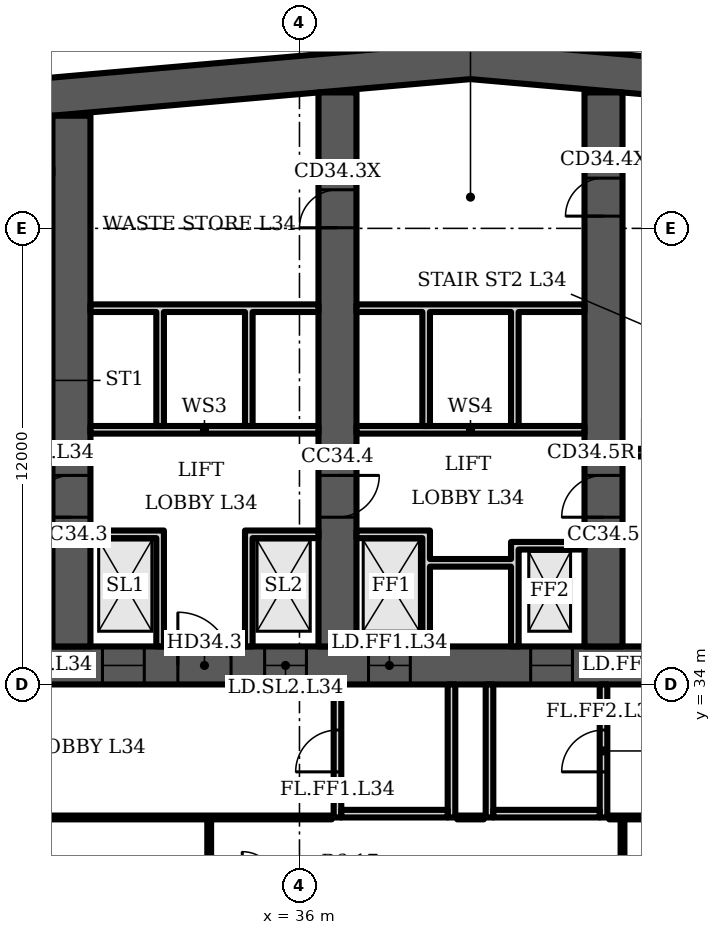
"""IFC4 building model, lengths in metres.
Left out: names, types, materials, properties, quantities, classifications, styles, units other than length and angle.
Written with IfcOpenShell. Run it as: python <this file> out.ifc"""

import sys

from ifc_helpers import new_model, si_unit, direction, frame, frame_2d, origin, place, context, subcontext, project, spatial, polyline, rectangle, outline, extrude, element, fill, save


model = new_model("IFC4")
c1 = context("Model", 3, precision=1e-05, world=origin(), true_north=direction((0.0, 1.0)))
c2 = subcontext(c1, "Body", "Model", "MODEL_VIEW")
j1 = project(units=[si_unit("LENGTHUNIT", "METRE"), si_unit("PLANEANGLEUNIT", "RADIAN")], contexts=[c1])
p1 = place(None, origin())
s1 = spatial("IfcSite", under=j1, at=p1, CompositionType="ELEMENT")
p2 = place(p1, origin())
s2 = spatial("IfcBuilding", under=s1, at=p2, CompositionType="ELEMENT")
p3 = place(p2, frame((0.0, 0.0, 143.5)))
s3 = spatial("IfcBuildingStorey", under=s2, at=p3, CompositionType="ELEMENT", Elevation=143.5)
p4 = place(p3, origin())
e1 = element("IfcWall", 1, at=p4, inside=s3, PredefinedType="SHEAR", context=c2, shape_type="SweptSolid", body=[
    extrude(outline(polyline([(16.0, 47.784), (40.5, 49.927), (65.0, 47.784), (65.0, 48.787), (40.5, 50.931), (16.0, 48.787), (16.0, 47.784)])), origin(), (0.0, 0.0, 1.0), 3.6),
])
p5 = place(p3, frame((16.0, 34.5, 0.0), z_axis=(0.0, 0.0, 1.0), x_axis=(1.0, 0.0, 0.0)))
e2 = element("IfcWall", 2, at=p5, inside=s3, PredefinedType="SHEAR", context=c2, shape_type="SweptSolid", body=[
    extrude(rectangle(XDim=49.0, YDim=1.0, at=frame_2d((24.5, 0.0))), origin(), (0.0, 0.0, 1.0), 3.6),
])
p6 = place(p5, frame((1.2, 0.0, 0.0)))
e3 = element("IfcOpeningElement", 3, at=p6, cuts=e2, PredefinedType="OPENING", context=c2, shape_type="SweptSolid", body=[
    extrude(rectangle(XDim=1.1, YDim=2.1, at=frame_2d((0.55, 1.05))), frame((0.0, 0.51, 0.0), z_axis=(0.0, -1.0, 0.0), x_axis=(1.0, 0.0, 0.0)), (0.0, 0.0, 1.0), 1.02),
])
p7 = place(p5, frame((5.083, 0.0, 0.0)))
e4 = element("IfcOpeningElement", 4, at=p7, cuts=e2, PredefinedType="OPENING", context=c2, shape_type="SweptSolid", body=[
    extrude(rectangle(XDim=1.1, YDim=2.1, at=frame_2d((0.55, 1.05))), frame((0.0, 0.51, 0.0), z_axis=(0.0, -1.0, 0.0), x_axis=(1.0, 0.0, 0.0)), (0.0, 0.0, 1.0), 1.02),
])
p8 = place(p5, frame((2.933, 0.0, 0.0)))
e5 = element("IfcOpeningElement", 5, at=p8, cuts=e2, PredefinedType="OPENING", context=c2, shape_type="SweptSolid", body=[
    extrude(rectangle(XDim=1.4, YDim=2.1, at=frame_2d((0.7, 1.05))), frame((0.0, 0.51, 0.0), z_axis=(0.0, -1.0, 0.0), x_axis=(1.0, 0.0, 0.0)), (0.0, 0.0, 1.0), 1.02),
])
p9 = place(p5, frame((7.65, 0.0, 0.0)))
e6 = element("IfcOpeningElement", 6, at=p9, cuts=e2, PredefinedType="OPENING", context=c2, shape_type="SweptSolid", body=[
    extrude(rectangle(XDim=1.2, YDim=2.1, at=frame_2d((0.6, 1.05))), frame((0.0, 0.51, 0.0), z_axis=(0.0, -1.0, 0.0), x_axis=(1.0, 0.0, 0.0)), (0.0, 0.0, 1.0), 1.02),
])
p10 = place(p5, frame((14.817, 0.0, 0.0)))
e7 = element("IfcOpeningElement", 7, at=p10, cuts=e2, PredefinedType="OPENING", context=c2, shape_type="SweptSolid", body=[
    extrude(rectangle(XDim=1.1, YDim=2.1, at=frame_2d((0.55, 1.05))), frame((0.0, 0.51, 0.0), z_axis=(0.0, -1.0, 0.0), x_axis=(1.0, 0.0, 0.0)), (0.0, 0.0, 1.0), 1.02),
])
p11 = place(p5, frame((19.083, 0.0, 0.0)))
e8 = element("IfcOpeningElement", 8, at=p11, cuts=e2, PredefinedType="OPENING", context=c2, shape_type="SweptSolid", body=[
    extrude(rectangle(XDim=1.1, YDim=2.1, at=frame_2d((0.55, 1.05))), frame((0.0, 0.51, 0.0), z_axis=(0.0, -1.0, 0.0), x_axis=(1.0, 0.0, 0.0)), (0.0, 0.0, 1.0), 1.02),
])
p12 = place(p5, frame((16.8, 0.0, 0.0)))
e9 = element("IfcOpeningElement", 9, at=p12, cuts=e2, PredefinedType="OPENING", context=c2, shape_type="SweptSolid", body=[
    extrude(rectangle(XDim=1.4, YDim=2.1, at=frame_2d((0.7, 1.05))), frame((0.0, 0.51, 0.0), z_axis=(0.0, -1.0, 0.0), x_axis=(1.0, 0.0, 0.0)), (0.0, 0.0, 1.0), 1.02),
])
p13 = place(p5, frame((21.817, 0.0, 0.0)))
e10 = element("IfcOpeningElement", 10, at=p13, cuts=e2, PredefinedType="OPENING", context=c2, shape_type="SweptSolid", body=[
    extrude(rectangle(XDim=1.1, YDim=2.1, at=frame_2d((0.55, 1.05))), frame((0.0, 0.51, 0.0), z_axis=(0.0, -1.0, 0.0), x_axis=(1.0, 0.0, 0.0)), (0.0, 0.0, 1.0), 1.02),
])
p14 = place(p5, frame((26.083, 0.0, 0.0)))
e11 = element("IfcOpeningElement", 11, at=p14, cuts=e2, PredefinedType="OPENING", context=c2, shape_type="SweptSolid", body=[
    extrude(rectangle(XDim=1.1, YDim=2.1, at=frame_2d((0.55, 1.05))), frame((0.0, 0.51, 0.0), z_axis=(0.0, -1.0, 0.0), x_axis=(1.0, 0.0, 0.0)), (0.0, 0.0, 1.0), 1.02),
])
p15 = place(p5, frame((33.15, 0.0, 0.0)))
e12 = element("IfcOpeningElement", 12, at=p15, cuts=e2, PredefinedType="OPENING", context=c2, shape_type="SweptSolid", body=[
    extrude(rectangle(XDim=1.2, YDim=2.1, at=frame_2d((0.6, 1.05))), frame((0.0, 0.51, 0.0), z_axis=(0.0, -1.0, 0.0), x_axis=(1.0, 0.0, 0.0)), (0.0, 0.0, 1.0), 1.02),
])
p16 = place(p5, frame((37.8, 0.0, 0.0)))
e13 = element("IfcOpeningElement", 13, at=p16, cuts=e2, PredefinedType="OPENING", context=c2, shape_type="SweptSolid", body=[
    extrude(rectangle(XDim=1.4, YDim=2.1, at=frame_2d((0.7, 1.05))), frame((0.0, 0.51, 0.0), z_axis=(0.0, -1.0, 0.0), x_axis=(1.0, 0.0, 0.0)), (0.0, 0.0, 1.0), 1.02),
])
p17 = place(p5, frame((42.817, 0.0, 0.0)))
e14 = element("IfcOpeningElement", 14, at=p17, cuts=e2, PredefinedType="OPENING", context=c2, shape_type="SweptSolid", body=[
    extrude(rectangle(XDim=1.1, YDim=2.1, at=frame_2d((0.55, 1.05))), frame((0.0, 0.51, 0.0), z_axis=(0.0, -1.0, 0.0), x_axis=(1.0, 0.0, 0.0)), (0.0, 0.0, 1.0), 1.02),
])
p18 = place(p5, frame((46.7, 0.0, 0.0)))
e15 = element("IfcOpeningElement", 15, at=p18, cuts=e2, PredefinedType="OPENING", context=c2, shape_type="SweptSolid", body=[
    extrude(rectangle(XDim=1.1, YDim=2.1, at=frame_2d((0.55, 1.05))), frame((0.0, 0.51, 0.0), z_axis=(0.0, -1.0, 0.0), x_axis=(1.0, 0.0, 0.0)), (0.0, 0.0, 1.0), 1.02),
])
p19 = place(p5, frame((44.667, 0.0, 0.0)))
e16 = element("IfcOpeningElement", 16, at=p19, cuts=e2, PredefinedType="OPENING", context=c2, shape_type="SweptSolid", body=[
    extrude(rectangle(XDim=1.4, YDim=2.1, at=frame_2d((0.7, 1.05))), frame((0.0, 0.51, 0.0), z_axis=(0.0, -1.0, 0.0), x_axis=(1.0, 0.0, 0.0)), (0.0, 0.0, 1.0), 1.02),
])
p20 = place(p3, frame((30.0, 35.0, 0.0), z_axis=(0.0, 0.0, 1.0), x_axis=(0.0, 1.0, 0.0)))
e17 = element("IfcWall", 17, at=p20, inside=s3, PredefinedType="SHEAR", context=c2, shape_type="SweptSolid", body=[
    extrude(rectangle(XDim=13.965, YDim=1.0, at=frame_2d((6.982, 0.0))), origin(), (0.0, 0.0, 1.0), 3.6),
])
p21 = place(p20, frame((3.4, 0.0, 0.0)))
e18 = element("IfcOpeningElement", 18, at=p21, cuts=e17, PredefinedType="OPENING", context=c2, shape_type="SweptSolid", body=[
    extrude(rectangle(XDim=1.1, YDim=2.1, at=frame_2d((0.55, 1.05))), frame((0.0, 0.51, 0.0), z_axis=(0.0, -1.0, 0.0), x_axis=(1.0, 0.0, 0.0)), (0.0, 0.0, 1.0), 1.02),
])
p22 = place(p3, frame((37.0, 35.0, 0.0), z_axis=(0.0, 0.0, 1.0), x_axis=(0.0, 1.0, 0.0)))
e19 = element("IfcWall", 19, at=p22, inside=s3, PredefinedType="SHEAR", context=c2, shape_type="SweptSolid", body=[
    extrude(rectangle(XDim=14.577, YDim=1.0, at=frame_2d((7.289, 0.0))), origin(), (0.0, 0.0, 1.0), 3.6),
])
p23 = place(p22, frame((11.016, 0.0, 0.0)))
e20 = element("IfcOpeningElement", 20, at=p23, cuts=e19, PredefinedType="OPENING", context=c2, shape_type="SweptSolid", body=[
    extrude(rectangle(XDim=1.0, YDim=2.1, at=frame_2d((0.5, 1.05))), frame((0.0, 0.51, 0.0), z_axis=(0.0, -1.0, 0.0), x_axis=(1.0, 0.0, 0.0)), (0.0, 0.0, 1.0), 1.02),
])
p24 = place(p22, frame((3.4, 0.0, 0.0)))
e21 = element("IfcOpeningElement", 21, at=p24, cuts=e19, PredefinedType="OPENING", context=c2, shape_type="SweptSolid", body=[
    extrude(rectangle(XDim=1.1, YDim=2.1, at=frame_2d((0.55, 1.05))), frame((0.0, 0.51, 0.0), z_axis=(0.0, -1.0, 0.0), x_axis=(1.0, 0.0, 0.0)), (0.0, 0.0, 1.0), 1.02),
])
p25 = place(p3, frame((44.0, 35.0, 0.0), z_axis=(0.0, 0.0, 1.0), x_axis=(0.0, 1.0, 0.0)))
e22 = element("IfcWall", 22, at=p25, inside=s3, PredefinedType="SHEAR", context=c2, shape_type="SweptSolid", body=[
    extrude(rectangle(XDim=14.577, YDim=1.0, at=frame_2d((7.289, 0.0))), origin(), (0.0, 0.0, 1.0), 3.6),
])
p26 = place(p25, frame((11.322, 0.0, 0.0)))
e23 = element("IfcOpeningElement", 23, at=p26, cuts=e22, PredefinedType="OPENING", context=c2, shape_type="SweptSolid", body=[
    extrude(rectangle(XDim=1.0, YDim=2.1, at=frame_2d((0.5, 1.05))), frame((0.0, 0.51, 0.0), z_axis=(0.0, -1.0, 0.0), x_axis=(1.0, 0.0, 0.0)), (0.0, 0.0, 1.0), 1.02),
])
p27 = place(p25, frame((3.4, 0.0, 0.0)))
e24 = element("IfcOpeningElement", 24, at=p27, cuts=e22, PredefinedType="OPENING", context=c2, shape_type="SweptSolid", body=[
    extrude(rectangle(XDim=1.1, YDim=2.1, at=frame_2d((0.55, 1.05))), frame((0.0, 0.51, 0.0), z_axis=(0.0, -1.0, 0.0), x_axis=(1.0, 0.0, 0.0)), (0.0, 0.0, 1.0), 1.02),
])
p28 = place(p3, frame((30.5, 40.7, 0.0), z_axis=(0.0, 0.0, 1.0), x_axis=(1.0, 0.0, 0.0)))
e25 = element("IfcWall", 25, at=p28, inside=s3, PredefinedType="PARTITIONING", context=c2, shape_type="SweptSolid", body=[
    extrude(rectangle(XDim=6.0, YDim=0.2, at=frame_2d((3.0, 0.0))), origin(), (0.0, 0.0, 1.0), 3.15),
])
p29 = place(p3, frame((0.0, 0.0, -0.0)))
e26 = element("IfcWall", 26, at=p29, inside=s3, PredefinedType="PARTITIONING", context=c2, shape_type="SweptSolid", body=[
    extrude(outline(polyline([(32.233, 37.85), (30.5, 37.85), (30.5, 38.05), (32.233, 38.05), (32.433, 38.05), (32.433, 35.0), (32.233, 35.0), (32.233, 37.85)])), origin(), (0.0, 0.0, 1.0), 3.15),
])
p30 = place(p3, frame((0.0, 0.0, -0.0)))
e27 = element("IfcWall", 27, at=p30, inside=s3, PredefinedType="PARTITIONING", context=c2, shape_type="SweptSolid", body=[
    extrude(outline(polyline([(34.567, 38.05), (34.767, 38.05), (36.5, 38.05), (36.5, 37.85), (34.767, 37.85), (34.767, 35.0), (34.567, 35.0), (34.567, 38.05)])), origin(), (0.0, 0.0, 1.0), 3.15),
])
p31 = place(p3, frame((0.0, 0.0, -0.0)))
e28 = element("IfcWall", 28, at=p31, inside=s3, PredefinedType="PARTITIONING", context=c2, shape_type="SweptSolid", body=[
    extrude(outline(polyline([(32.433, 40.8), (32.233, 40.8), (32.233, 43.8), (30.5, 43.8), (30.5, 44.0), (36.5, 44.0), (36.5, 43.8), (34.767, 43.8), (34.767, 40.8), (34.567, 40.8), (34.567, 43.8), (32.433, 43.8), (32.433, 40.8)])), origin(), (0.0, 0.0, 1.0), 3.15),
])
p32 = place(p3, frame((37.5, 40.7, 0.0), z_axis=(0.0, 0.0, 1.0), x_axis=(1.0, 0.0, 0.0)))
e29 = element("IfcWall", 29, at=p32, inside=s3, PredefinedType="PARTITIONING", context=c2, shape_type="SweptSolid", body=[
    extrude(rectangle(XDim=6.0, YDim=0.2, at=frame_2d((3.0, 0.0))), origin(), (0.0, 0.0, 1.0), 3.15),
])
p33 = place(p3, frame((0.0, 0.0, -0.0)))
e30 = element("IfcWall", 30, at=p33, inside=s3, PredefinedType="PARTITIONING", context=c2, shape_type="SweptSolid", body=[
    extrude(outline(polyline([(41.567, 37.1), (39.433, 37.1), (39.433, 35.0), (39.233, 35.0), (39.233, 37.85), (37.5, 37.85), (37.5, 38.05), (39.233, 38.05), (39.433, 38.05), (39.433, 37.3), (41.567, 37.3), (41.567, 37.75), (41.767, 37.75), (43.5, 37.75), (43.5, 37.55), (41.767, 37.55), (41.767, 35.0), (41.567, 35.0), (41.567, 37.1)])), origin(), (0.0, 0.0, 1.0), 3.15),
])
p34 = place(p3, frame((0.0, 0.0, -0.0)))
e31 = element("IfcWall", 31, at=p34, inside=s3, PredefinedType="PARTITIONING", context=c2, shape_type="SweptSolid", body=[
    extrude(outline(polyline([(39.433, 40.8), (39.233, 40.8), (39.233, 43.8), (37.5, 43.8), (37.5, 44.0), (43.5, 44.0), (43.5, 43.8), (41.767, 43.8), (41.767, 40.8), (41.567, 40.8), (41.567, 43.8), (39.433, 43.8), (39.433, 40.8)])), origin(), (0.0, 0.0, 1.0), 3.15),
])
p35 = place(p3, frame((44.5, 40.1, 0.0), z_axis=(0.0, 0.0, 1.0), x_axis=(1.0, 0.0, 0.0)))
e32 = element("IfcWall", 32, at=p35, inside=s3, PredefinedType="SHEAR", context=c2, shape_type="SweptSolid", body=[
    extrude(rectangle(XDim=6.0, YDim=0.2, at=frame_2d((3.0, 0.0))), origin(), (0.0, 0.0, 1.0), 3.15),
])
p36 = place(p35, frame((3.425, 0.0, 0.0)))
e33 = element("IfcOpeningElement", 33, at=p36, cuts=e32, PredefinedType="OPENING", context=c2, shape_type="SweptSolid", body=[
    extrude(rectangle(XDim=1.2, YDim=2.1, at=frame_2d((0.6, 1.05))), frame((0.0, 0.11, 0.0), z_axis=(0.0, -1.0, 0.0), x_axis=(1.0, 0.0, 0.0)), (0.0, 0.0, 1.0), 0.22),
])
p37 = place(p35, frame((0.525, 0.0, 0.0)))
e34 = element("IfcOpeningElement", 34, at=p37, cuts=e32, PredefinedType="OPENING", context=c2, shape_type="SweptSolid", body=[
    extrude(rectangle(XDim=0.9, YDim=2.1, at=frame_2d((0.45, 1.05))), frame((0.0, 0.11, 0.0), z_axis=(0.0, -1.0, 0.0), x_axis=(1.0, 0.0, 0.0)), (0.0, 0.0, 1.0), 0.22),
])
p38 = place(p3, frame((37.0, 30.5, 0.0), z_axis=(0.0, 0.0, 1.0), x_axis=(0.0, 1.0, 0.0)))
e35 = element("IfcWall", 35, at=p38, inside=s3, PredefinedType="PARTITIONING", context=c2, shape_type="SweptSolid", body=[
    extrude(rectangle(XDim=3.5, YDim=0.2, at=frame_2d((1.75, 0.0))), origin(), (0.0, 0.0, 1.0), 3.15),
])
p39 = place(p38, frame((1.2, 0.0, 0.0)))
e36 = element("IfcOpeningElement", 36, at=p39, cuts=e35, PredefinedType="OPENING", context=c2, shape_type="SweptSolid", body=[
    extrude(rectangle(XDim=1.1, YDim=2.1, at=frame_2d((0.55, 1.05))), frame((0.0, 0.11, 0.0), z_axis=(0.0, -1.0, 0.0), x_axis=(1.0, 0.0, 0.0)), (0.0, 0.0, 1.0), 0.22),
])
p40 = place(p3, frame((40.0, 30.5, 0.0), z_axis=(0.0, 0.0, 1.0), x_axis=(0.0, 1.0, 0.0)))
e37 = element("IfcWall", 37, at=p40, inside=s3, PredefinedType="PARTITIONING", context=c2, shape_type="SweptSolid", body=[
    extrude(rectangle(XDim=3.5, YDim=0.2, at=frame_2d((1.75, 0.0))), origin(), (0.0, 0.0, 1.0), 3.15),
])
p41 = place(p3, frame((37.1, 30.6, 0.0), z_axis=(0.0, 0.0, 1.0), x_axis=(1.0, 0.0, 0.0)))
e38 = element("IfcWall", 38, at=p41, inside=s3, PredefinedType="PARTITIONING", context=c2, shape_type="SweptSolid", body=[
    extrude(rectangle(XDim=2.8, YDim=0.2, at=frame_2d((1.4, 0.0))), origin(), (0.0, 0.0, 1.0), 3.15),
])
p42 = place(p3, frame((41.0, 30.5, 0.0), z_axis=(0.0, 0.0, 1.0), x_axis=(0.0, 1.0, 0.0)))
e39 = element("IfcWall", 39, at=p42, inside=s3, PredefinedType="PARTITIONING", context=c2, shape_type="SweptSolid", body=[
    extrude(rectangle(XDim=3.5, YDim=0.2, at=frame_2d((1.75, 0.0))), origin(), (0.0, 0.0, 1.0), 3.15),
])
p43 = place(p3, frame((44.0, 30.5, 0.0), z_axis=(0.0, 0.0, 1.0), x_axis=(0.0, 1.0, 0.0)))
e40 = element("IfcWall", 40, at=p43, inside=s3, PredefinedType="PARTITIONING", context=c2, shape_type="SweptSolid", body=[
    extrude(rectangle(XDim=3.5, YDim=0.2, at=frame_2d((1.75, 0.0))), origin(), (0.0, 0.0, 1.0), 3.15),
])
p44 = place(p43, frame((1.2, 0.0, 0.0)))
e41 = element("IfcOpeningElement", 41, at=p44, cuts=e40, PredefinedType="OPENING", context=c2, shape_type="SweptSolid", body=[
    extrude(rectangle(XDim=1.1, YDim=2.1, at=frame_2d((0.55, 1.05))), frame((0.0, 0.11, 0.0), z_axis=(0.0, -1.0, 0.0), x_axis=(1.0, 0.0, 0.0)), (0.0, 0.0, 1.0), 0.22),
])
p45 = place(p3, frame((41.1, 30.6, 0.0), z_axis=(0.0, 0.0, 1.0), x_axis=(1.0, 0.0, 0.0)))
e42 = element("IfcWall", 42, at=p45, inside=s3, PredefinedType="PARTITIONING", context=c2, shape_type="SweptSolid", body=[
    extrude(rectangle(XDim=2.8, YDim=0.2, at=frame_2d((1.4, 0.0))), origin(), (0.0, 0.0, 1.0), 3.15),
])
p46 = place(p3, frame((17.8, 30.5, 0.0), z_axis=(0.0, 0.0, 1.0), x_axis=(1.0, 0.0, 0.0)))
e43 = element("IfcWall", 43, at=p46, inside=s3, PredefinedType="PARTITIONING", context=c2, shape_type="SweptSolid", body=[
    extrude(rectangle(XDim=19.05, YDim=0.1, at=frame_2d((9.525, 0.0))), origin(), (0.0, 0.0, 1.0), 3.15),
])
p47 = place(p46, frame((7.5, 0.0, 0.0)))
e44 = element("IfcOpeningElement", 44, at=p47, cuts=e43, PredefinedType="OPENING", context=c2, shape_type="SweptSolid", body=[
    extrude(rectangle(XDim=1.0, YDim=2.1, at=frame_2d((0.5, 1.05))), frame((0.0, 0.06, 0.0), z_axis=(0.0, -1.0, 0.0), x_axis=(1.0, 0.0, 0.0)), (0.0, 0.0, 1.0), 0.12),
])
p48 = place(p3, frame((33.625, 14.53, 0.0), z_axis=(0.0, 0.0, 1.0), x_axis=(0.0, 1.0, 0.0)))
e45 = element("IfcWall", 45, at=p48, inside=s3, PredefinedType="PARTITIONING", context=c2, shape_type="SweptSolid", body=[
    extrude(rectangle(XDim=15.96, YDim=0.1, at=frame_2d((7.98, 0.0))), origin(), (0.0, 0.0, 1.0), 3.15),
])
p49 = place(p3, frame((44.5, 14.53, 0.0), z_axis=(0.0, 0.0, 1.0), x_axis=(0.0, 1.0, 0.0)))
e46 = element("IfcWall", 46, at=p49, inside=s3, PredefinedType="PARTITIONING", context=c2, shape_type="SweptSolid", body=[
    extrude(rectangle(XDim=15.97, YDim=0.1, at=frame_2d((7.985, 0.0))), origin(), (0.0, 0.0, 1.0), 3.15),
])
p50 = place(p3, frame((40.15, 30.5, 0.0), z_axis=(0.0, 0.0, 1.0), x_axis=(1.0, 0.0, 0.0)))
e47 = element("IfcWall", 47, at=p50, inside=s3, PredefinedType="PARTITIONING", context=c2, shape_type="SweptSolid", body=[
    extrude(rectangle(XDim=0.7, YDim=0.1, at=frame_2d((0.35, 0.0))), origin(), (0.0, 0.0, 1.0), 3.15),
])
p51 = place(p3, frame((44.15, 30.5, 0.0), z_axis=(0.0, 0.0, 1.0), x_axis=(1.0, 0.0, 0.0)))
e48 = element("IfcWall", 48, at=p51, inside=s3, PredefinedType="PARTITIONING", context=c2, shape_type="SweptSolid", body=[
    extrude(rectangle(XDim=19.425, YDim=0.1, at=frame_2d((9.712, 0.0))), origin(), (0.0, 0.0, 1.0), 3.15),
])
p52 = place(p10, origin())
e49 = element("IfcDoor", 49, at=p52, inside=s3, OperationType="DOUBLE_DOOR_SLIDING", PredefinedType="DOOR", context=c2, shape_type="SweptSolid", body=[
    extrude(rectangle(XDim=1.1, YDim=2.1, at=frame_2d((0.55, 1.05))), frame((0.0, 0.025, 0.0), z_axis=(0.0, -1.0, 0.0), x_axis=(1.0, 0.0, 0.0)), (0.0, 0.0, 1.0), 0.05),
])
fill(e7, e49)
p53 = place(p11, origin())
e50 = element("IfcDoor", 50, at=p53, inside=s3, OperationType="DOUBLE_DOOR_SLIDING", PredefinedType="DOOR", context=c2, shape_type="SweptSolid", body=[
    extrude(rectangle(XDim=1.1, YDim=2.1, at=frame_2d((0.55, 1.05))), frame((0.0, 0.025, 0.0), z_axis=(0.0, -1.0, 0.0), x_axis=(1.0, 0.0, 0.0)), (0.0, 0.0, 1.0), 0.05),
])
fill(e8, e50)
p54 = place(p12, origin())
e51 = element("IfcDoor", 51, at=p54, inside=s3, OperationType="DOUBLE_DOOR_SINGLE_SWING", PredefinedType="DOOR", context=c2, shape_type="SweptSolid", body=[
    extrude(rectangle(XDim=1.4, YDim=2.1, at=frame_2d((0.7, 1.05))), frame((0.0, 0.025, 0.0), z_axis=(0.0, -1.0, 0.0), x_axis=(1.0, 0.0, 0.0)), (0.0, 0.0, 1.0), 0.05),
])
fill(e9, e51)
p55 = place(p23, origin())
e52 = element("IfcDoor", 52, at=p55, inside=s3, OperationType="SINGLE_SWING_LEFT", PredefinedType="DOOR", context=c2, shape_type="SweptSolid", body=[
    extrude(rectangle(XDim=1.0, YDim=2.1, at=frame_2d((0.5, 1.05))), frame((0.0, 0.5, 0.0), z_axis=(0.0, -1.0, 0.0), x_axis=(1.0, 0.0, 0.0)), (0.0, 0.0, 1.0), 1.0),
])
fill(e20, e52)
p56 = place(p13, origin())
e53 = element("IfcDoor", 53, at=p56, inside=s3, OperationType="DOUBLE_DOOR_SLIDING", PredefinedType="DOOR", context=c2, shape_type="SweptSolid", body=[
    extrude(rectangle(XDim=1.1, YDim=2.1, at=frame_2d((0.55, 1.05))), frame((0.0, 0.025, 0.0), z_axis=(0.0, -1.0, 0.0), x_axis=(1.0, 0.0, 0.0)), (0.0, 0.0, 1.0), 0.05),
])
fill(e10, e53)
p57 = place(p14, origin())
e54 = element("IfcDoor", 54, at=p57, inside=s3, OperationType="DOUBLE_DOOR_SLIDING", PredefinedType="DOOR", context=c2, shape_type="SweptSolid", body=[
    extrude(rectangle(XDim=1.1, YDim=2.1, at=frame_2d((0.55, 1.05))), frame((0.0, 0.025, 0.0), z_axis=(0.0, -1.0, 0.0), x_axis=(1.0, 0.0, 0.0)), (0.0, 0.0, 1.0), 0.05),
])
fill(e11, e54)
p58 = place(p26, origin())
e55 = element("IfcDoor", 55, at=p58, inside=s3, OperationType="SINGLE_SWING_LEFT", PredefinedType="DOOR", context=c2, shape_type="SweptSolid", body=[
    extrude(rectangle(XDim=1.0, YDim=2.1, at=frame_2d((0.5, 1.05))), frame((0.0, 0.5, 0.0), z_axis=(0.0, -1.0, 0.0), x_axis=(1.0, 0.0, 0.0)), (0.0, 0.0, 1.0), 1.0),
])
fill(e23, e55)
p59 = place(p21, origin())
e56 = element("IfcDoor", 56, at=p59, inside=s3, OperationType="SINGLE_SWING_LEFT", PredefinedType="DOOR", context=c2, shape_type="SweptSolid", body=[
    extrude(rectangle(XDim=1.1, YDim=2.1, at=frame_2d((0.55, 1.05))), frame((0.0, 0.025, 0.0), z_axis=(0.0, -1.0, 0.0), x_axis=(1.0, 0.0, 0.0)), (0.0, 0.0, 1.0), 0.05),
])
fill(e18, e56)
p60 = place(p24, origin())
e57 = element("IfcDoor", 57, at=p60, inside=s3, OperationType="SINGLE_SWING_RIGHT", PredefinedType="DOOR", context=c2, shape_type="SweptSolid", body=[
    extrude(rectangle(XDim=1.1, YDim=2.1, at=frame_2d((0.55, 1.05))), frame((0.0, 0.025, 0.0), z_axis=(0.0, -1.0, 0.0), x_axis=(1.0, 0.0, 0.0)), (0.0, 0.0, 1.0), 0.05),
])
fill(e21, e57)
p61 = place(p27, origin())
e58 = element("IfcDoor", 58, at=p61, inside=s3, OperationType="SINGLE_SWING_LEFT", PredefinedType="DOOR", context=c2, shape_type="SweptSolid", body=[
    extrude(rectangle(XDim=1.1, YDim=2.1, at=frame_2d((0.55, 1.05))), frame((0.0, 0.025, 0.0), z_axis=(0.0, -1.0, 0.0), x_axis=(1.0, 0.0, 0.0)), (0.0, 0.0, 1.0), 0.05),
])
fill(e24, e58)
p62 = place(p39, origin())
e59 = element("IfcDoor", 59, at=p62, inside=s3, OperationType="SINGLE_SWING_LEFT", PredefinedType="DOOR", context=c2, shape_type="SweptSolid", body=[
    extrude(rectangle(XDim=1.1, YDim=2.1, at=frame_2d((0.55, 1.05))), frame((0.0, 0.025, 0.0), z_axis=(0.0, -1.0, 0.0), x_axis=(1.0, 0.0, 0.0)), (0.0, 0.0, 1.0), 0.05),
])
fill(e36, e59)
p63 = place(p44, origin())
e60 = element("IfcDoor", 60, at=p63, inside=s3, OperationType="SINGLE_SWING_LEFT", PredefinedType="DOOR", context=c2, shape_type="SweptSolid", body=[
    extrude(rectangle(XDim=1.1, YDim=2.1, at=frame_2d((0.55, 1.05))), frame((0.0, 0.025, 0.0), z_axis=(0.0, -1.0, 0.0), x_axis=(1.0, 0.0, 0.0)), (0.0, 0.0, 1.0), 0.05),
])
fill(e41, e60)
save(model, sys.argv[1])
